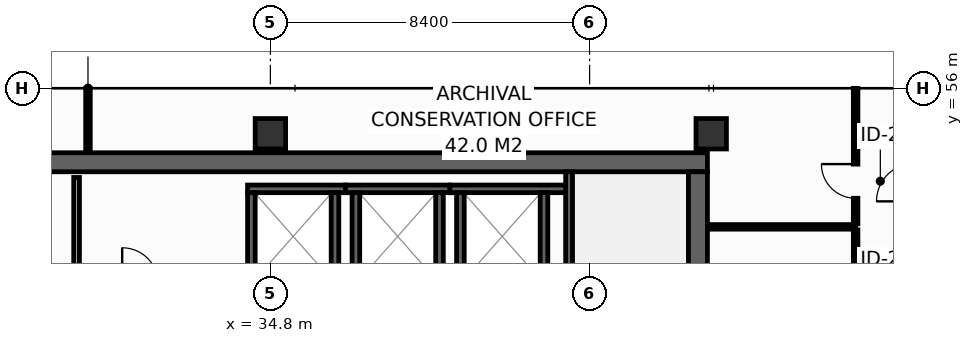
"""IFC4 building model, lengths in metres.
Left out: names, types, materials, properties, quantities, classifications, styles, units other than length and angle.
Written with IfcOpenShell. Run it as: python <this file> out.ifc"""

import sys

from ifc_helpers import new_model, si_unit, direction, frame, frame_2d, origin, origin_2d, place, context, subcontext, project, spatial, rectangle, hollow_rectangle, extrude, element, fill, save


model = new_model("IFC4")
c1 = context("Model", 3, precision=1e-05, world=origin(), true_north=direction((0.0, 1.0)))
c2 = subcontext(c1, "Body", "Model", "MODEL_VIEW")
j1 = project(units=[si_unit("LENGTHUNIT", "METRE"), si_unit("PLANEANGLEUNIT", "RADIAN")], contexts=[c1])
p1 = place(None, origin())
s1 = spatial("IfcSite", under=j1, at=p1, CompositionType="ELEMENT")
p2 = place(p1, origin())
s2 = spatial("IfcBuilding", under=s1, at=p2, CompositionType="ELEMENT")
p3 = place(p2, frame((0.0, 0.0, 182.8)))
s3 = spatial("IfcBuildingStorey", under=s2, at=p3, CompositionType="ELEMENT", Elevation=182.8)
p4 = place(p3, frame((13.6, 54.05, 0.0), z_axis=(0.0, 0.0, 1.0), x_axis=(1.0, 0.0, 0.0)))
e1 = element("IfcWall", 1, at=p4, inside=s3, PredefinedType="SHEAR", context=c2, shape_type="SweptSolid", body=[
    extrude(rectangle(XDim=32.7, YDim=0.5, at=frame_2d((16.35, 0.0))), origin(), (0.0, 0.0, 1.0), 3.55),
])
p5 = place(p3, frame((46.05, 43.4, 0.0), z_axis=(0.0, 0.0, 1.0), x_axis=(0.0, 1.0, 0.0)))
e2 = element("IfcWall", 2, at=p5, inside=s3, PredefinedType="SHEAR", context=c2, shape_type="SweptSolid", body=[
    extrude(rectangle(XDim=10.4, YDim=0.5, at=frame_2d((5.2, 0.0))), origin(), (0.0, 0.0, 1.0), 3.55),
])
for number, where, z_axis, x_axis in (
    (3, (34.8, 54.8, 0.0), (0.0, 0.0, 1.0), (1.0, 0.0, 0.0)),
    (4, (46.4, 54.8, 0.0), (0.0, 0.0, 1.0), (1.0, 0.0, 0.0)),
):
    element("IfcColumn", number, at=place(p3, frame(where, z_axis=z_axis, x_axis=x_axis)), inside=s3, PredefinedType="COLUMN", context=c2, shape_type="SweptSolid", body=[
        extrude(hollow_rectangle(XDim=0.8, YDim=0.8, WallThickness=0.036, at=origin_2d()), origin(), (0.0, 0.0, 1.0), 3.8),
    ])
p6 = place(p3, frame((34.2, 53.35, 0.0), z_axis=(0.0, 0.0, 1.0), x_axis=(1.0, 0.0, 0.0)))
e5 = element("IfcWall", 5, at=p6, inside=s3, PredefinedType="SHEAR", context=c2, shape_type="SweptSolid", body=[
    extrude(rectangle(XDim=2.575, YDim=0.2, at=frame_2d((1.288, 0.0))), origin(), (0.0, 0.0, 1.0), 3.55),
])
for number, where, z_axis, x_axis in (
    (6, (34.3, 50.95, 0.0), (0.0, 0.0, 1.0), (0.0, 1.0, 0.0)),
    (7, (36.5, 50.95, 0.0), (0.0, 0.0, 1.0), (0.0, 1.0, 0.0)),
):
    element("IfcWall", number, at=place(p3, frame(where, z_axis=z_axis, x_axis=x_axis)), inside=s3, PredefinedType="SHEAR", context=c2, shape_type="SweptSolid", body=[
        extrude(rectangle(XDim=2.3, YDim=0.2, at=frame_2d((1.15, 0.0))), origin(), (0.0, 0.0, 1.0), 3.55),
    ])
p7 = place(p3, frame((36.775, 53.35, 0.0), z_axis=(0.0, 0.0, 1.0), x_axis=(1.0, 0.0, 0.0)))
e8 = element("IfcWall", 8, at=p7, inside=s3, PredefinedType="SHEAR", context=c2, shape_type="SweptSolid", body=[
    extrude(rectangle(XDim=2.75, YDim=0.2, at=frame_2d((1.375, 0.0))), origin(), (0.0, 0.0, 1.0), 3.55),
])
for number, where, z_axis, x_axis in (
    (9, (37.05, 50.95, 0.0), (0.0, 0.0, 1.0), (0.0, 1.0, 0.0)),
    (10, (39.25, 50.95, 0.0), (0.0, 0.0, 1.0), (0.0, 1.0, 0.0)),
):
    element("IfcWall", number, at=place(p3, frame(where, z_axis=z_axis, x_axis=x_axis)), inside=s3, PredefinedType="SHEAR", context=c2, shape_type="SweptSolid", body=[
        extrude(rectangle(XDim=2.3, YDim=0.2, at=frame_2d((1.15, 0.0))), origin(), (0.0, 0.0, 1.0), 3.55),
    ])
p8 = place(p3, frame((39.525, 53.35, 0.0), z_axis=(0.0, 0.0, 1.0), x_axis=(1.0, 0.0, 0.0)))
e11 = element("IfcWall", 11, at=p8, inside=s3, PredefinedType="SHEAR", context=c2, shape_type="SweptSolid", body=[
    extrude(rectangle(XDim=3.045, YDim=0.2, at=frame_2d((1.522, 0.0))), origin(), (0.0, 0.0, 1.0), 3.55),
])
for number, where, z_axis, x_axis in (
    (12, (39.8, 50.95, 0.0), (0.0, 0.0, 1.0), (0.0, 1.0, 0.0)),
    (13, (42.0, 50.95, 0.0), (0.0, 0.0, 1.0), (0.0, 1.0, 0.0)),
):
    element("IfcWall", number, at=place(p3, frame(where, z_axis=z_axis, x_axis=x_axis)), inside=s3, PredefinedType="SHEAR", context=c2, shape_type="SweptSolid", body=[
        extrude(rectangle(XDim=2.3, YDim=0.2, at=frame_2d((1.15, 0.0))), origin(), (0.0, 0.0, 1.0), 3.55),
    ])
p9 = place(p3, frame((42.66, 53.8, 0.0), z_axis=(0.0, 0.0, 1.0), x_axis=(0.0, -1.0, 0.0)))
e14 = element("IfcWall", 14, at=p9, inside=s3, PredefinedType="SHEAR", context=c2, shape_type="SweptSolid", body=[
    extrude(rectangle(XDim=10.4, YDim=0.18, at=frame_2d((5.2, 0.0))), origin(), (0.0, 0.0, 1.0), 3.55),
])
p10 = place(p9, frame((8.99, 0.0, 0.0)))
e15 = element("IfcOpeningElement", 15, at=p10, cuts=e14, PredefinedType="OPENING", context=c2, shape_type="SweptSolid", body=[
    extrude(rectangle(XDim=1.1, YDim=2.15, at=frame_2d((0.55, 1.075))), frame((0.0, 0.1, 0.0), z_axis=(0.0, -1.0, 0.0), x_axis=(1.0, 0.0, 0.0)), (0.0, 0.0, 1.0), 0.2),
])
p11 = place(p3, frame((29.7, 50.95, 0.0), z_axis=(0.0, 0.0, 1.0), x_axis=(0.0, 1.0, 0.0)))
e16 = element("IfcWall", 16, at=p11, inside=s3, PredefinedType="PARTITIONING", context=c2, shape_type="SweptSolid", body=[
    extrude(rectangle(XDim=2.7, YDim=0.15, at=frame_2d((1.35, 0.0))), origin(), (0.0, 0.0, 1.0), 3.55),
])
p12 = place(p3, frame((46.32, 52.35, 0.0), z_axis=(0.0, 0.0, 1.0), x_axis=(1.0, 0.0, 0.0)))
e17 = element("IfcWall", 17, at=p12, inside=s3, PredefinedType="PARTITIONING", context=c2, shape_type="SweptSolid", body=[
    extrude(rectangle(XDim=3.88, YDim=0.12, at=frame_2d((1.94, 0.0))), origin(), (0.0, 0.0, 1.0), 3.55),
])
p13 = place(p3, frame((30.0, 54.32, 0.0), z_axis=(0.0, 0.0, 1.0), x_axis=(0.0, 1.0, 0.0)))
e18 = element("IfcWall", 18, at=p13, inside=s3, PredefinedType="PARTITIONING", context=c2, shape_type="SweptSolid", body=[
    extrude(rectangle(XDim=1.675, YDim=0.12, at=frame_2d((0.837, 0.0))), origin(), (0.0, 0.0, 1.0), 2.935),
])
p14 = place(p3, frame((50.2, 48.29, 0.0), z_axis=(0.0, 0.0, 1.0), x_axis=(0.0, 1.0, 0.0)))
e19 = element("IfcWall", 19, at=p14, inside=s3, PredefinedType="PARTITIONING", context=c2, shape_type="SweptSolid", body=[
    extrude(rectangle(XDim=3.98, YDim=0.12, at=frame_2d((1.99, 0.0))), origin(), (0.0, 0.0, 1.0), 3.55),
])
p15 = place(p14, frame((1.54, 0.0, 0.0)))
e20 = element("IfcOpeningElement", 20, at=p15, cuts=e19, PredefinedType="OPENING", context=c2, shape_type="SweptSolid", body=[
    extrude(rectangle(XDim=0.9, YDim=2.1, at=frame_2d((0.45, 1.05))), frame((0.0, 0.07, 0.0), z_axis=(0.0, -1.0, 0.0), x_axis=(1.0, 0.0, 0.0)), (0.0, 0.0, 1.0), 0.14),
])
p16 = place(p3, frame((50.2, 52.43, 0.0), z_axis=(0.0, 0.0, 1.0), x_axis=(0.0, 1.0, 0.0)))
e21 = element("IfcWall", 21, at=p16, inside=s3, PredefinedType="PARTITIONING", context=c2, shape_type="SweptSolid", body=[
    extrude(rectangle(XDim=3.565, YDim=0.12, at=frame_2d((1.783, 0.0))), origin(), (0.0, 0.0, 1.0), 2.935),
])
p17 = place(p16, frame((0.672, 0.0, 0.0)))
e22 = element("IfcOpeningElement", 22, at=p17, cuts=e21, PredefinedType="OPENING", context=c2, shape_type="SweptSolid", body=[
    extrude(rectangle(XDim=0.9, YDim=2.1, at=frame_2d((0.45, 1.05))), frame((0.0, 0.07, 0.0), z_axis=(0.0, -1.0, 0.0), x_axis=(1.0, 0.0, 0.0)), (0.0, 0.0, 1.0), 0.14),
])
p18 = place(p17, origin())
e23 = element("IfcDoor", 23, at=p18, inside=s3, OperationType="SINGLE_SWING_RIGHT", PredefinedType="DOOR", context=c2, shape_type="SweptSolid", body=[
    extrude(rectangle(XDim=0.9, YDim=2.1, at=frame_2d((0.45, 1.05))), frame((0.0, 0.025, 0.0), z_axis=(0.0, -1.0, 0.0), x_axis=(1.0, 0.0, 0.0)), (0.0, 0.0, 1.0), 0.05),
])
fill(e22, e23)
save(model, sys.argv[1])
